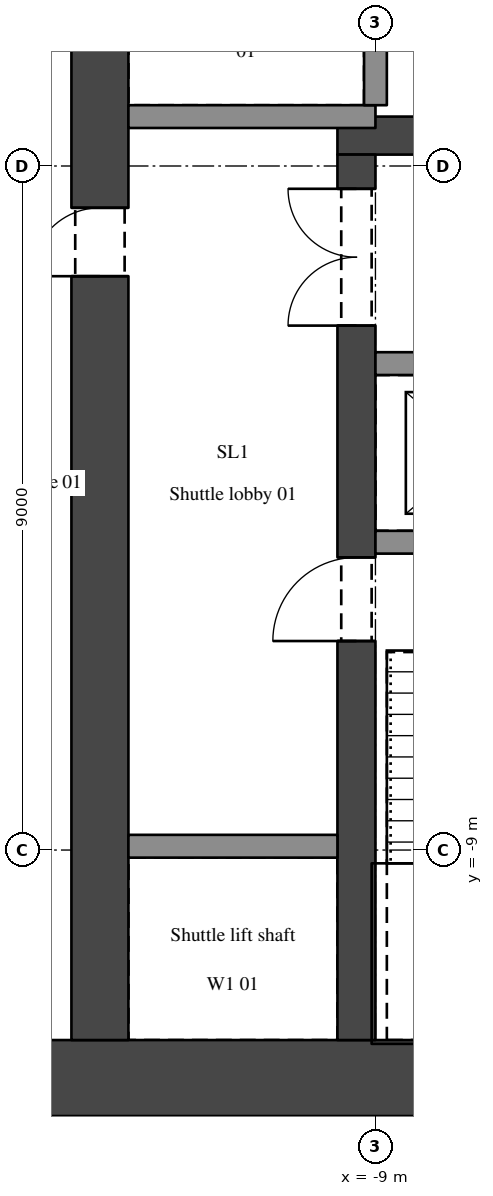
"""IFC4 building model, lengths in metres.
Left out: names, types, materials, properties, quantities, classifications, styles, units other than length and angle.
Written with IfcOpenShell. Run it as: python <this file> out.ifc"""

import sys

from ifc_helpers import new_model, si_unit, direction, frame, frame_2d, origin, place, context, subcontext, project, spatial, rectangle, extrude, element, fill, save


model = new_model("IFC4")
c1 = context("Model", 3, precision=1e-05, world=origin(), true_north=direction((0.0, 1.0)))
c2 = subcontext(c1, "Body", "Model", "MODEL_VIEW")
j1 = project(units=[si_unit("LENGTHUNIT", "METRE"), si_unit("PLANEANGLEUNIT", "RADIAN")], contexts=[c1])
p1 = place(None, origin())
s1 = spatial("IfcSite", under=j1, at=p1, CompositionType="ELEMENT")
p2 = place(p1, origin())
s2 = spatial("IfcBuilding", under=s1, at=p2, CompositionType="ELEMENT")
p3 = place(p2, frame((0.0, 0.0, 53.7)))
s3 = spatial("IfcBuildingStorey", under=s2, at=p3, CompositionType="ELEMENT", Elevation=53.7)
p4 = place(p3, frame((-15.0, -12.0, 0.0), z_axis=(0.0, 0.0, 1.0), x_axis=(1.0, 0.0, 0.0)))
e1 = element("IfcWall", 1, at=p4, inside=s3, PredefinedType="SHEAR", context=c2, shape_type="SweptSolid", body=[
    extrude(rectangle(XDim=30.0, YDim=1.0, at=frame_2d((15.0, 0.0))), origin(), (0.0, 0.0, 1.0), 3.9),
])
p5 = place(p3, frame((-12.625, -11.5, 0.0), z_axis=(0.0, 0.0, 1.0), x_axis=(0.0, 1.0, 0.0)))
e2 = element("IfcWall", 2, at=p5, inside=s3, PredefinedType="SHEAR", context=c2, shape_type="SweptSolid", body=[
    extrude(rectangle(XDim=14.65, YDim=0.75, at=frame_2d((7.325, 0.0))), origin(), (0.0, 0.0, 1.0), 3.9),
])
p6 = place(p5, frame((10.05, 0.0, 0.0)))
e3 = element("IfcOpeningElement", 3, at=p6, cuts=e2, PredefinedType="OPENING", context=c2, shape_type="SweptSolid", body=[
    extrude(rectangle(XDim=0.9, YDim=2.1, at=frame_2d((0.45, 1.05))), frame((0.0, 0.385, 0.0), z_axis=(0.0, -1.0, 0.0), x_axis=(1.0, 0.0, 0.0)), (0.0, 0.0, 1.0), 0.77),
])
p7 = place(p3, frame((-9.5, 0.4, 0.0), z_axis=(0.0, 0.0, 1.0), x_axis=(1.0, 0.0, 0.0)))
e4 = element("IfcWall", 4, at=p7, inside=s3, PredefinedType="SHEAR", context=c2, shape_type="SweptSolid", body=[
    extrude(rectangle(XDim=19.0, YDim=0.5, at=frame_2d((9.5, 0.0))), origin(), (0.0, 0.0, 1.0), 3.9),
])
p8 = place(p7, frame((1.4, 0.0, 0.0)))
e5 = element("IfcOpeningElement", 5, at=p8, cuts=e4, PredefinedType="OPENING", context=c2, shape_type="SweptSolid", body=[
    extrude(rectangle(XDim=0.9, YDim=2.1, at=frame_2d((0.45, 1.05))), frame((0.0, 0.26, 0.0), z_axis=(0.0, -1.0, 0.0), x_axis=(1.0, 0.0, 0.0)), (0.0, 0.0, 1.0), 0.52),
])
p9 = place(p7, frame((4.1, 0.0, 0.0)))
e6 = element("IfcOpeningElement", 6, at=p9, cuts=e4, PredefinedType="OPENING", context=c2, shape_type="SweptSolid", body=[
    extrude(rectangle(XDim=0.9, YDim=2.1, at=frame_2d((0.45, 1.05))), frame((0.0, 0.26, 0.0), z_axis=(0.0, -1.0, 0.0), x_axis=(1.0, 0.0, 0.0)), (0.0, 0.0, 1.0), 0.52),
])
p10 = place(p7, frame((6.8, 0.0, 0.0)))
e7 = element("IfcOpeningElement", 7, at=p10, cuts=e4, PredefinedType="OPENING", context=c2, shape_type="SweptSolid", body=[
    extrude(rectangle(XDim=0.9, YDim=2.1, at=frame_2d((0.45, 1.05))), frame((0.0, 0.26, 0.0), z_axis=(0.0, -1.0, 0.0), x_axis=(1.0, 0.0, 0.0)), (0.0, 0.0, 1.0), 0.52),
])
p11 = place(p7, frame((11.3, 0.0, 0.0)))
e8 = element("IfcOpeningElement", 8, at=p11, cuts=e4, PredefinedType="OPENING", context=c2, shape_type="SweptSolid", body=[
    extrude(rectangle(XDim=0.9, YDim=2.1, at=frame_2d((0.45, 1.05))), frame((0.0, 0.26, 0.0), z_axis=(0.0, -1.0, 0.0), x_axis=(1.0, 0.0, 0.0)), (0.0, 0.0, 1.0), 0.52),
])
p12 = place(p7, frame((14.0, 0.0, 0.0)))
e9 = element("IfcOpeningElement", 9, at=p12, cuts=e4, PredefinedType="OPENING", context=c2, shape_type="SweptSolid", body=[
    extrude(rectangle(XDim=0.9, YDim=2.1, at=frame_2d((0.45, 1.05))), frame((0.0, 0.26, 0.0), z_axis=(0.0, -1.0, 0.0), x_axis=(1.0, 0.0, 0.0)), (0.0, 0.0, 1.0), 0.52),
])
p13 = place(p7, frame((16.7, 0.0, 0.0)))
e10 = element("IfcOpeningElement", 10, at=p13, cuts=e4, PredefinedType="OPENING", context=c2, shape_type="SweptSolid", body=[
    extrude(rectangle(XDim=0.9, YDim=2.1, at=frame_2d((0.45, 1.05))), frame((0.0, 0.26, 0.0), z_axis=(0.0, -1.0, 0.0), x_axis=(1.0, 0.0, 0.0)), (0.0, 0.0, 1.0), 0.52),
])
p14 = place(p7, frame((9.05, 0.0, 0.0)))
e11 = element("IfcOpeningElement", 11, at=p14, cuts=e4, PredefinedType="OPENING", context=c2, shape_type="SweptSolid", body=[
    extrude(rectangle(XDim=0.9, YDim=2.1, at=frame_2d((0.45, 1.05))), frame((0.0, 0.26, 0.0), z_axis=(0.0, -1.0, 0.0), x_axis=(1.0, 0.0, 0.0)), (0.0, 0.0, 1.0), 0.52),
])
p15 = place(p3, frame((-9.25, -11.5, 0.0), z_axis=(0.0, 0.0, 1.0), x_axis=(0.0, 1.0, 0.0)))
e12 = element("IfcWall", 12, at=p15, inside=s3, PredefinedType="SHEAR", context=c2, shape_type="SweptSolid", body=[
    extrude(rectangle(XDim=11.65, YDim=0.5, at=frame_2d((5.825, 0.0))), origin(), (0.0, 0.0, 1.0), 3.9),
])
p16 = place(p15, frame((9.4, 0.0, 0.0)))
e13 = element("IfcOpeningElement", 13, at=p16, cuts=e12, PredefinedType="OPENING", context=c2, shape_type="SweptSolid", body=[
    extrude(rectangle(XDim=1.8, YDim=2.1, at=frame_2d((0.9, 1.05))), frame((0.0, 0.26, 0.0), z_axis=(0.0, -1.0, 0.0), x_axis=(1.0, 0.0, 0.0)), (0.0, 0.0, 1.0), 0.52),
])
p17 = place(p15, frame((5.25, 0.0, 0.0)))
e14 = element("IfcOpeningElement", 14, at=p17, cuts=e12, PredefinedType="OPENING", context=c2, shape_type="SweptSolid", body=[
    extrude(rectangle(XDim=1.1, YDim=2.1, at=frame_2d((0.55, 1.05))), frame((0.0, 0.26, 0.0), z_axis=(0.0, -1.0, 0.0), x_axis=(1.0, 0.0, 0.0)), (0.0, 0.0, 1.0), 0.52),
])
p18 = place(p3, frame((-12.25, -8.95, 0.0), z_axis=(0.0, 0.0, 1.0), x_axis=(1.0, 0.0, 0.0)))
e15 = element("IfcWall", 15, at=p18, inside=s3, PredefinedType="SHEAR", context=c2, shape_type="SweptSolid", body=[
    extrude(rectangle(XDim=2.75, YDim=0.3, at=frame_2d((1.375, 0.0))), origin(), (0.0, 0.0, 1.0), 3.9),
])
p19 = place(p3, frame((-9.0, -4.95, 0.0), z_axis=(0.0, 0.0, 1.0), x_axis=(1.0, 0.0, 0.0)))
e16 = element("IfcWall", 16, at=p19, inside=s3, PredefinedType="SHEAR", context=c2, shape_type="SweptSolid", body=[
    extrude(rectangle(XDim=8.1, YDim=0.3, at=frame_2d((4.05, 0.0))), origin(), (0.0, 0.0, 1.0), 3.9),
])
p20 = place(p3, frame((-9.0, -2.6, 0.0), z_axis=(0.0, 0.0, 1.0), x_axis=(1.0, 0.0, 0.0)))
e17 = element("IfcWall", 17, at=p20, inside=s3, PredefinedType="SHEAR", context=c2, shape_type="SweptSolid", body=[
    extrude(rectangle(XDim=8.1, YDim=0.3, at=frame_2d((4.05, 0.0))), origin(), (0.0, 0.0, 1.0), 3.9),
])
p21 = place(p20, frame((0.8, 0.0, 0.0)))
e18 = element("IfcOpeningElement", 18, at=p21, cuts=e17, PredefinedType="OPENING", context=c2, shape_type="SweptSolid", body=[
    extrude(rectangle(XDim=1.1, YDim=2.1, at=frame_2d((0.55, 1.05))), frame((0.0, 0.16, 0.0), z_axis=(0.0, -1.0, 0.0), x_axis=(1.0, 0.0, 0.0)), (0.0, 0.0, 1.0), 0.32),
])
p22 = place(p20, frame((3.5, 0.0, 0.0)))
e19 = element("IfcOpeningElement", 19, at=p22, cuts=e17, PredefinedType="OPENING", context=c2, shape_type="SweptSolid", body=[
    extrude(rectangle(XDim=1.1, YDim=2.1, at=frame_2d((0.55, 1.05))), frame((0.0, 0.16, 0.0), z_axis=(0.0, -1.0, 0.0), x_axis=(1.0, 0.0, 0.0)), (0.0, 0.0, 1.0), 0.32),
])
p23 = place(p20, frame((6.2, 0.0, 0.0)))
e20 = element("IfcOpeningElement", 20, at=p23, cuts=e17, PredefinedType="OPENING", context=c2, shape_type="SweptSolid", body=[
    extrude(rectangle(XDim=1.1, YDim=2.1, at=frame_2d((0.55, 1.05))), frame((0.0, 0.16, 0.0), z_axis=(0.0, -1.0, 0.0), x_axis=(1.0, 0.0, 0.0)), (0.0, 0.0, 1.0), 0.32),
])
p24 = place(p3, frame((-9.0, 0.65, 0.0), z_axis=(0.0, 0.0, 1.0), x_axis=(-1.0, 0.0, 0.0)))
e21 = element("IfcWall", 21, at=p24, inside=s3, PredefinedType="SHEAR", context=c2, shape_type="SweptSolid", body=[
    extrude(rectangle(XDim=3.25, YDim=0.3, at=frame_2d((1.625, 0.0))), origin(), (0.0, 0.0, 1.0), 3.9),
])
p25 = place(p3, frame((-9.0, 0.8, 0.0), z_axis=(0.0, 0.0, 1.0), x_axis=(0.0, 1.0, 0.0)))
e22 = element("IfcWall", 22, at=p25, inside=s3, PredefinedType="SHEAR", context=c2, shape_type="SweptSolid", body=[
    extrude(rectangle(XDim=2.35, YDim=0.3, at=frame_2d((1.175, 0.0))), origin(), (0.0, 0.0, 1.0), 3.9),
])
p26 = place(p16, origin())
e23 = element("IfcDoor", 23, at=p26, inside=s3, OperationType="DOUBLE_DOOR_SINGLE_SWING", PredefinedType="DOOR", context=c2, shape_type="SweptSolid", body=[
    extrude(rectangle(XDim=1.8, YDim=2.1, at=frame_2d((0.9, 1.05))), frame((0.0, 0.025, 0.0), z_axis=(0.0, -1.0, 0.0), x_axis=(1.0, 0.0, 0.0)), (0.0, 0.0, 1.0), 0.05),
])
fill(e13, e23)
p27 = place(p17, origin())
e24 = element("IfcDoor", 24, at=p27, inside=s3, OperationType="SINGLE_SWING_LEFT", PredefinedType="DOOR", context=c2, shape_type="SweptSolid", body=[
    extrude(rectangle(XDim=1.1, YDim=2.1, at=frame_2d((0.55, 1.05))), frame((0.0, 0.025, 0.0), z_axis=(0.0, -1.0, 0.0), x_axis=(1.0, 0.0, 0.0)), (0.0, 0.0, 1.0), 0.05),
])
fill(e14, e24)
p28 = place(p6, origin())
e25 = element("IfcDoor", 25, at=p28, inside=s3, OperationType="SINGLE_SWING_LEFT", PredefinedType="DOOR", context=c2, shape_type="SweptSolid", body=[
    extrude(rectangle(XDim=0.9, YDim=2.1, at=frame_2d((0.45, 1.05))), frame((0.0, 0.025, 0.0), z_axis=(0.0, -1.0, 0.0), x_axis=(1.0, 0.0, 0.0)), (0.0, 0.0, 1.0), 0.05),
])
fill(e3, e25)
save(model, sys.argv[1])
